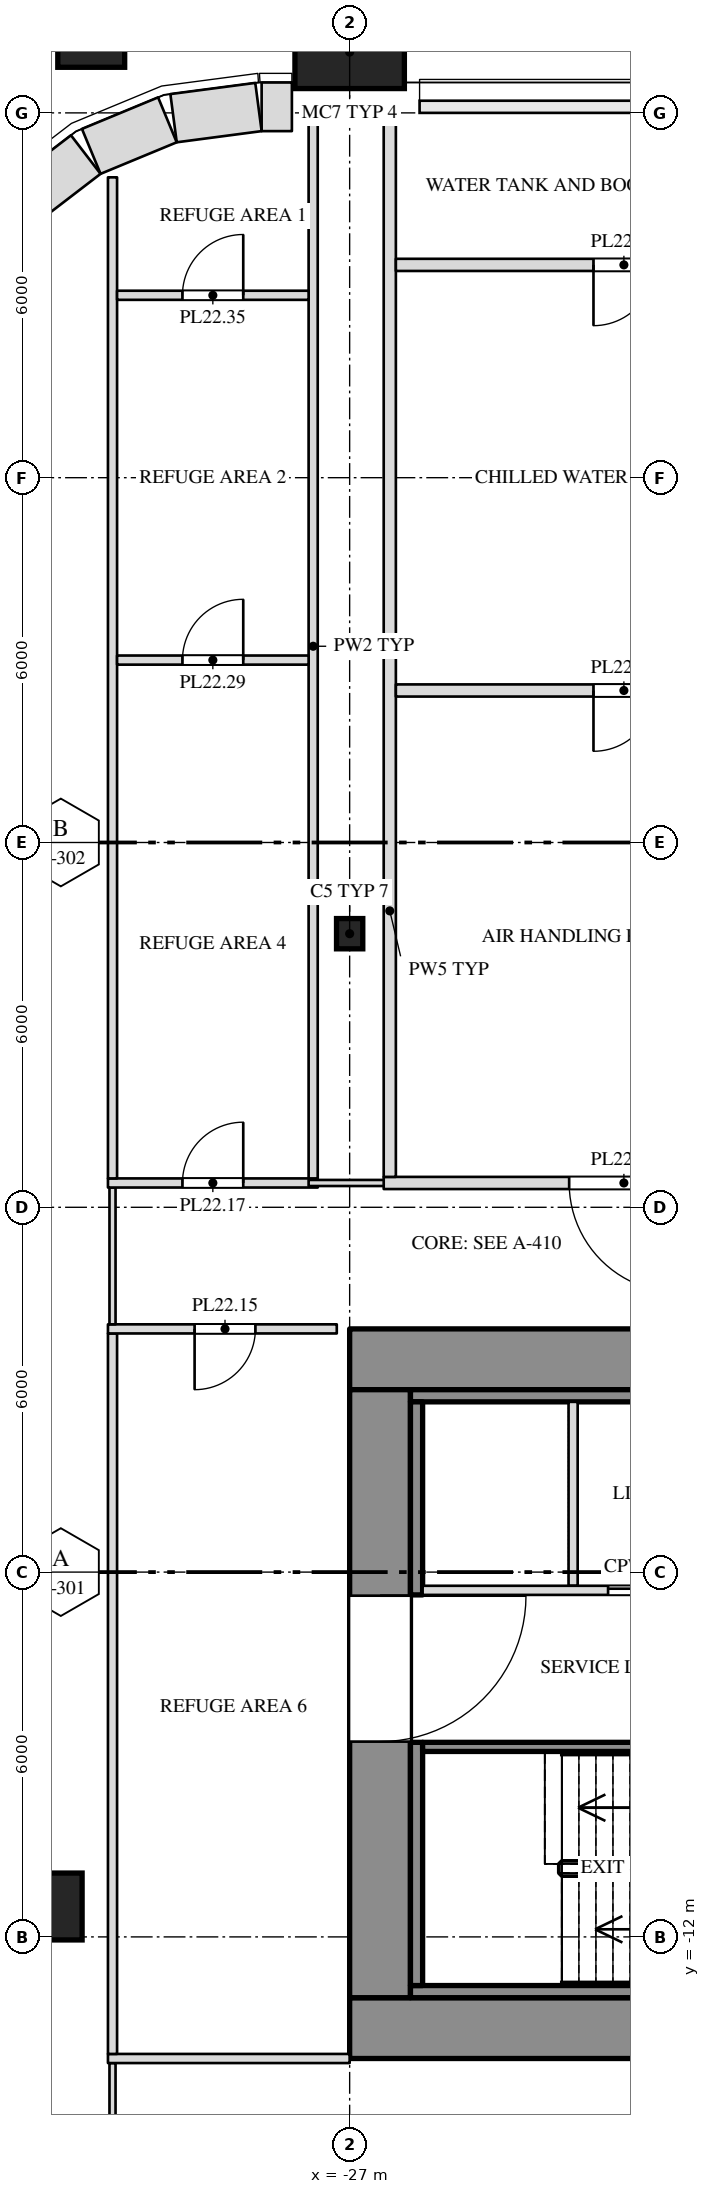
"""IFC4 building model, lengths in metres.
Left out: names, types, materials, properties, quantities, classifications, styles, units other than length and angle.
Written with IfcOpenShell. Run it as: python <this file> out.ifc"""

import sys

from ifc_helpers import new_model, si_unit, direction, frame, frame_2d, origin, origin_2d, place, context, subcontext, project, spatial, rectangle, i_section, extrude, clip, halfspace, element, fill, save


model = new_model("IFC4")
c1 = context("Model", 3, precision=1e-05, world=origin(), true_north=direction((0.0, 1.0)))
c2 = subcontext(c1, "Body", "Model", "MODEL_VIEW")
j1 = project(units=[si_unit("LENGTHUNIT", "METRE"), si_unit("PLANEANGLEUNIT", "RADIAN")], contexts=[c1])
p1 = place(None, origin())
s1 = spatial("IfcSite", under=j1, at=p1, CompositionType="ELEMENT")
p2 = place(p1, origin())
s2 = spatial("IfcBuilding", under=s1, at=p2, CompositionType="ELEMENT")
p3 = place(p2, frame((0.0, 0.0, 104.5)))
s3 = spatial("IfcBuildingStorey", under=s2, at=p3, CompositionType="ELEMENT", Elevation=104.5)
p4 = place(p3, frame((-31.95, -11.5, 0.0), z_axis=(0.0, 0.0, 1.0), x_axis=(1.0, 0.0, 0.0)))
e1 = element("IfcColumn", 1, at=p4, inside=s3, PredefinedType="COLUMN", context=c2, shape_type="SweptSolid", body=[
    extrude(rectangle(XDim=1.1, YDim=1.1, at=origin_2d()), origin(), (0.0, 0.0, 1.0), 4.0),
])
p5 = place(p3, frame((-27.0, 4.5, 0.0), z_axis=(0.0, 0.0, 1.0), x_axis=(1.0, 0.0, 0.0)))
e2 = element("IfcColumn", 2, at=p5, inside=s3, PredefinedType="COLUMN", context=c2, shape_type="SweptSolid", body=[
    extrude(i_section(OverallWidth=0.432, OverallDepth=0.498, WebThickness=0.056, FlangeThickness=0.089, at=origin_2d()), origin(), (0.0, 0.0, 1.0), 4.0),
])
p6 = place(p3, frame((-31.25, 19.0, 0.0), z_axis=(0.0, 0.242535625036, 0.970142500145), x_axis=(-1.0, 0.0, 0.0)))
e3 = element("IfcColumn", 3, at=p6, inside=s3, PredefinedType="COLUMN", context=c2, shape_type="Clipping", body=[
    clip(extrude(rectangle(XDim=1.1, YDim=1.1, at=origin_2d()), origin(), (0.0, 0.0, 1.0), 4.123), halfspace(frame((0.0, 0.0, 3.986)), False)),
])
p7 = place(p3, frame((-27.0, 19.0, 0.0), z_axis=(0.0, 0.242535625036, 0.970142500145), x_axis=(-1.0, 0.0, 0.0)))
e4 = element("IfcColumn", 4, at=p7, inside=s3, PredefinedType="COLUMN", context=c2, shape_type="Clipping", body=[
    clip(extrude(rectangle(XDim=1.8, YDim=1.8, at=origin_2d()), origin(), (0.0, 0.0, 1.0), 4.123), halfspace(frame((0.0, 0.0, 3.898)), False)),
])
p8 = place(p3, frame((-27.0, -2.5, 0.0), z_axis=(0.0, 0.0, 1.0), x_axis=(1.0, 0.0, 0.0)))
e5 = element("IfcWall", 5, at=p8, inside=s3, PredefinedType="SHEAR", context=c2, shape_type="SweptSolid", body=[
    extrude(rectangle(XDim=54.0, YDim=1.0, at=frame_2d((27.0, 0.0))), origin(), (0.0, 0.0, 1.0), 3.8),
])
p9 = place(p8, frame((15.15, 0.0, 0.0)))
e6 = element("IfcOpeningElement", 6, at=p9, cuts=e5, PredefinedType="OPENING", context=c2, shape_type="SweptSolid", body=[
    extrude(rectangle(XDim=2.4, YDim=2.1, at=frame_2d((1.2, 1.05))), frame((0.0, 0.512, 0.0), z_axis=(0.0, -1.0, 0.0), x_axis=(1.0, 0.0, 0.0)), (0.0, 0.0, 1.0), 1.024),
])
p10 = place(p8, frame((36.45, 0.0, 0.0)))
e7 = element("IfcOpeningElement", 7, at=p10, cuts=e5, PredefinedType="OPENING", context=c2, shape_type="SweptSolid", body=[
    extrude(rectangle(XDim=2.4, YDim=2.1, at=frame_2d((1.2, 1.05))), frame((0.0, 0.512, 0.0), z_axis=(0.0, -1.0, 0.0), x_axis=(1.0, 0.0, 0.0)), (0.0, 0.0, 1.0), 1.024),
])
p11 = place(p3, frame((-27.0, -13.5, 0.0), z_axis=(0.0, 0.0, 1.0), x_axis=(1.0, 0.0, 0.0)))
e8 = element("IfcWall", 8, at=p11, inside=s3, PredefinedType="SHEAR", context=c2, shape_type="SweptSolid", body=[
    extrude(rectangle(XDim=54.0, YDim=1.0, at=frame_2d((27.0, 0.0))), origin(), (0.0, 0.0, 1.0), 3.8),
])
p12 = place(p11, frame((16.45, 0.0, 0.0)))
e9 = element("IfcOpeningElement", 9, at=p12, cuts=e8, PredefinedType="OPENING", context=c2, shape_type="SweptSolid", body=[
    extrude(rectangle(XDim=1.0, YDim=2.1, at=frame_2d((0.5, 1.05))), frame((0.0, 0.512, 0.0), z_axis=(0.0, -1.0, 0.0), x_axis=(1.0, 0.0, 0.0)), (0.0, 0.0, 1.0), 1.024),
])
p13 = place(p11, frame((36.55, 0.0, 0.0)))
e10 = element("IfcOpeningElement", 10, at=p13, cuts=e8, PredefinedType="OPENING", context=c2, shape_type="SweptSolid", body=[
    extrude(rectangle(XDim=1.0, YDim=2.1, at=frame_2d((0.5, 1.05))), frame((0.0, 0.512, 0.0), z_axis=(0.0, -1.0, 0.0), x_axis=(1.0, 0.0, 0.0)), (0.0, 0.0, 1.0), 1.024),
])
p14 = place(p3, frame((-26.5, -13.0, 0.0), z_axis=(0.0, 0.0, 1.0), x_axis=(0.0, 1.0, 0.0)))
e11 = element("IfcWall", 11, at=p14, inside=s3, PredefinedType="SHEAR", context=c2, shape_type="SweptSolid", body=[
    extrude(rectangle(XDim=10.0, YDim=1.0, at=frame_2d((5.0, 0.0))), origin(), (0.0, 0.0, 1.0), 3.8),
])
p15 = place(p14, frame((4.212, 0.0, 0.0)))
e12 = element("IfcOpeningElement", 12, at=p15, cuts=e11, PredefinedType="OPENING", context=c2, shape_type="SweptSolid", body=[
    extrude(rectangle(XDim=2.4, YDim=2.1, at=frame_2d((1.2, 1.05))), frame((0.0, 0.512, 0.0), z_axis=(0.0, -1.0, 0.0), x_axis=(1.0, 0.0, 0.0)), (0.0, 0.0, 1.0), 1.024),
])
p16 = place(p3, frame((-26.0, -3.1, 0.0), z_axis=(0.0, 0.0, 1.0), x_axis=(1.0, 0.0, 0.0)))
e13 = element("IfcWall", 13, at=p16, inside=s3, PredefinedType="SHEAR", context=c2, shape_type="SweptSolid", body=[
    extrude(rectangle(XDim=14.0, YDim=0.2, at=frame_2d((7.0, 0.0))), origin(), (0.0, 0.0, 1.0), 3.8),
])
p17 = place(p3, frame((-26.0, -12.9, 0.0), z_axis=(0.0, 0.0, 1.0), x_axis=(1.0, 0.0, 0.0)))
e14 = element("IfcWall", 14, at=p17, inside=s3, PredefinedType="SHEAR", context=c2, shape_type="SweptSolid", body=[
    extrude(rectangle(XDim=15.2, YDim=0.2, at=frame_2d((7.6, 0.0))), origin(), (0.0, 0.0, 1.0), 3.8),
])
p18 = place(p3, frame((-25.9, -12.8, 0.0), z_axis=(0.0, 0.0, 1.0), x_axis=(0.0, 1.0, 0.0)))
e15 = element("IfcWall", 15, at=p18, inside=s3, PredefinedType="SHEAR", context=c2, shape_type="SweptSolid", body=[
    extrude(rectangle(XDim=4.0, YDim=0.2, at=frame_2d((2.0, 0.0))), origin(), (0.0, 0.0, 1.0), 3.8),
])
p19 = place(p3, frame((-25.9, -6.375, 0.0), z_axis=(0.0, 0.0, 1.0), x_axis=(0.0, 1.0, 0.0)))
e16 = element("IfcWall", 16, at=p19, inside=s3, PredefinedType="SHEAR", context=c2, shape_type="SweptSolid", body=[
    extrude(rectangle(XDim=3.175, YDim=0.2, at=frame_2d((1.587, 0.0))), origin(), (0.0, 0.0, 1.0), 3.8),
])
p20 = place(p3, frame((-30.9, -16.425, 0.0), z_axis=(0.0, 0.0, 1.0), x_axis=(0.0, 1.0, 0.0)))
e17 = element("IfcWall", 17, at=p20, inside=s3, PredefinedType="PARTITIONING", context=c2, shape_type="SweptSolid", body=[
    extrude(rectangle(XDim=2.35, YDim=0.1, at=frame_2d((1.175, 0.0))), origin(), (0.0, 0.0, 1.0), 3.8),
])
p21 = place(p3, frame((-30.975, -14.0, 0.0), z_axis=(0.0, 0.0, 1.0), x_axis=(1.0, 0.0, 0.0)))
e18 = element("IfcWall", 18, at=p21, inside=s3, PredefinedType="PARTITIONING", context=c2, shape_type="SweptSolid", body=[
    extrude(rectangle(XDim=3.975, YDim=0.15, at=frame_2d((1.988, 0.0))), origin(), (0.0, 0.0, 1.0), 3.8),
])
p22 = place(p3, frame((-30.9, -13.925, 0.0), z_axis=(0.0, 0.0, 1.0), x_axis=(0.0, 1.0, 0.0)))
e19 = element("IfcWall", 19, at=p22, inside=s3, PredefinedType="PARTITIONING", context=c2, shape_type="SweptSolid", body=[
    extrude(rectangle(XDim=11.85, YDim=0.15, at=frame_2d((5.925, 0.0))), origin(), (0.0, 0.0, 1.0), 3.8),
])
p23 = place(p3, frame((-30.975, -2.0, 0.0), z_axis=(0.0, 0.0, 1.0), x_axis=(1.0, 0.0, 0.0)))
e20 = element("IfcWall", 20, at=p23, inside=s3, PredefinedType="PARTITIONING", context=c2, shape_type="SweptSolid", body=[
    extrude(rectangle(XDim=3.763, YDim=0.15, at=frame_2d((1.882, 0.0))), origin(), (0.0, 0.0, 1.0), 3.8),
])
p24 = place(p23, frame((1.425, 0.0, 0.0)))
e21 = element("IfcOpeningElement", 21, at=p24, cuts=e20, PredefinedType="OPENING", context=c2, shape_type="SweptSolid", body=[
    extrude(rectangle(XDim=1.0, YDim=2.1, at=frame_2d((0.5, 1.05))), frame((0.0, 0.087, 0.0), z_axis=(0.0, -1.0, 0.0), x_axis=(1.0, 0.0, 0.0)), (0.0, 0.0, 1.0), 0.174),
])
p25 = place(p3, frame((-30.9, -1.925, 0.0), z_axis=(0.0, 0.0, 1.0), x_axis=(0.0, 1.0, 0.0)))
e22 = element("IfcWall", 22, at=p25, inside=s3, PredefinedType="PARTITIONING", context=c2, shape_type="SweptSolid", body=[
    extrude(rectangle(XDim=2.25, YDim=0.1, at=frame_2d((1.125, 0.0))), origin(), (0.0, 0.0, 1.0), 3.8),
])
p26 = place(p3, frame((-30.975, 0.4, 0.0), z_axis=(0.0, 0.0, 1.0), x_axis=(1.0, 0.0, 0.0)))
e23 = element("IfcWall", 23, at=p26, inside=s3, PredefinedType="PARTITIONING", context=c2, shape_type="SweptSolid", body=[
    extrude(rectangle(XDim=3.45, YDim=0.15, at=frame_2d((1.725, 0.0))), origin(), (0.0, 0.0, 1.0), 3.8),
])
p27 = place(p26, frame((1.225, 0.0, 0.0)))
e24 = element("IfcOpeningElement", 24, at=p27, cuts=e23, PredefinedType="OPENING", context=c2, shape_type="SweptSolid", body=[
    extrude(rectangle(XDim=1.0, YDim=2.1, at=frame_2d((0.5, 1.05))), frame((0.0, 0.087, 0.0), z_axis=(0.0, -1.0, 0.0), x_axis=(1.0, 0.0, 0.0)), (0.0, 0.0, 1.0), 0.174),
])
p28 = place(p3, frame((-30.9, 0.475, 0.0), z_axis=(0.0, 0.0, 1.0), x_axis=(0.0, 1.0, 0.0)))
e25 = element("IfcWall", 25, at=p28, inside=s3, PredefinedType="PARTITIONING", context=c2, shape_type="SweptSolid", body=[
    extrude(rectangle(XDim=16.465, YDim=0.15, at=frame_2d((8.232, 0.0))), origin(), (0.0, 0.0, 1.0), 3.8),
])
p29 = place(p3, frame((-27.675, 0.4, 0.0), z_axis=(0.0, 0.0, 1.0), x_axis=(1.0, 0.0, 0.0)))
e26 = element("IfcWall", 26, at=p29, inside=s3, PredefinedType="PARTITIONING", context=c2, shape_type="SweptSolid", body=[
    extrude(rectangle(XDim=1.435, YDim=0.1, at=frame_2d((0.718, 0.0))), origin(), (0.0, 0.0, 1.0), 3.8),
])
p30 = place(p3, frame((-27.6, 0.475, 0.0), z_axis=(0.0, 0.0, 1.0), x_axis=(0.0, 1.0, 0.0)))
e27 = element("IfcWall", 27, at=p30, inside=s3, PredefinedType="PARTITIONING", context=c2, shape_type="SweptSolid", body=[
    extrude(rectangle(XDim=17.505, YDim=0.15, at=frame_2d((8.752, 0.0))), origin(), (0.0, 0.0, 1.0), 3.8),
])
p31 = place(p3, frame((-26.44, 0.4, 0.0), z_axis=(0.0, 0.0, 1.0), x_axis=(1.0, 0.0, 0.0)))
e28 = element("IfcWall", 28, at=p31, inside=s3, PredefinedType="PARTITIONING", context=c2, shape_type="SweptSolid", body=[
    extrude(rectangle(XDim=7.88, YDim=0.2, at=frame_2d((3.94, 0.0))), origin(), (0.0, 0.0, 1.0), 3.8),
])
p32 = place(p31, frame((3.05, 0.0, 0.0)))
e29 = element("IfcOpeningElement", 29, at=p32, cuts=e28, PredefinedType="OPENING", context=c2, shape_type="SweptSolid", body=[
    extrude(rectangle(XDim=1.8, YDim=2.1, at=frame_2d((0.9, 1.05))), frame((0.0, 0.112, 0.0), z_axis=(0.0, -1.0, 0.0), x_axis=(1.0, 0.0, 0.0)), (0.0, 0.0, 1.0), 0.224),
])
p33 = place(p3, frame((-26.34, 0.5, 0.0), z_axis=(0.0, 0.0, 1.0), x_axis=(0.0, 1.0, 0.0)))
e30 = element("IfcWall", 30, at=p33, inside=s3, PredefinedType="PARTITIONING", context=c2, shape_type="SweptSolid", body=[
    extrude(rectangle(XDim=17.5, YDim=0.2, at=frame_2d((8.75, 0.0))), origin(), (0.0, 0.0, 1.0), 3.8),
])
p34 = place(p3, frame((-26.24, 8.5, 0.0), z_axis=(0.0, 0.0, 1.0), x_axis=(1.0, 0.0, 0.0)))
e31 = element("IfcWall", 31, at=p34, inside=s3, PredefinedType="PARTITIONING", context=c2, shape_type="SweptSolid", body=[
    extrude(rectangle(XDim=7.48, YDim=0.2, at=frame_2d((3.74, 0.0))), origin(), (0.0, 0.0, 1.0), 3.8),
])
p35 = place(p34, frame((3.25, 0.0, 0.0)))
e32 = element("IfcOpeningElement", 32, at=p35, cuts=e31, PredefinedType="OPENING", context=c2, shape_type="SweptSolid", body=[
    extrude(rectangle(XDim=1.0, YDim=2.1, at=frame_2d((0.5, 1.05))), frame((0.0, 0.112, 0.0), z_axis=(0.0, -1.0, 0.0), x_axis=(1.0, 0.0, 0.0)), (0.0, 0.0, 1.0), 0.224),
])
p36 = place(p3, frame((-30.825, 9.0, 0.0), z_axis=(0.0, 0.0, 1.0), x_axis=(1.0, 0.0, 0.0)))
e33 = element("IfcWall", 33, at=p36, inside=s3, PredefinedType="PARTITIONING", context=c2, shape_type="SweptSolid", body=[
    extrude(rectangle(XDim=3.15, YDim=0.15, at=frame_2d((1.575, 0.0))), origin(), (0.0, 0.0, 1.0), 3.198),
])
p37 = place(p36, frame((1.075, 0.0, 0.0)))
e34 = element("IfcOpeningElement", 34, at=p37, cuts=e33, PredefinedType="OPENING", context=c2, shape_type="SweptSolid", body=[
    extrude(rectangle(XDim=1.0, YDim=2.1, at=frame_2d((0.5, 1.05))), frame((0.0, 0.087, 0.0), z_axis=(0.0, -1.0, 0.0), x_axis=(1.0, 0.0, 0.0)), (0.0, 0.0, 1.0), 0.174),
])
p38 = place(p3, frame((-30.825, 15.0, 0.0), z_axis=(0.0, 0.0, 1.0), x_axis=(1.0, 0.0, 0.0)))
e35 = element("IfcWall", 35, at=p38, inside=s3, PredefinedType="PARTITIONING", context=c2, shape_type="SweptSolid", body=[
    extrude(rectangle(XDim=3.15, YDim=0.15, at=frame_2d((1.575, 0.0))), origin(), (0.0, 0.0, 1.0), 3.8),
])
p39 = place(p38, frame((1.075, 0.0, 0.0)))
e36 = element("IfcOpeningElement", 36, at=p39, cuts=e35, PredefinedType="OPENING", context=c2, shape_type="SweptSolid", body=[
    extrude(rectangle(XDim=1.0, YDim=2.1, at=frame_2d((0.5, 1.05))), frame((0.0, 0.087, 0.0), z_axis=(0.0, -1.0, 0.0), x_axis=(1.0, 0.0, 0.0)), (0.0, 0.0, 1.0), 0.174),
])
p40 = place(p3, frame((-26.24, 15.5, 0.0), z_axis=(0.0, 0.0, 1.0), x_axis=(1.0, 0.0, 0.0)))
e37 = element("IfcWall", 37, at=p40, inside=s3, PredefinedType="PARTITIONING", context=c2, shape_type="SweptSolid", body=[
    extrude(rectangle(XDim=7.48, YDim=0.2, at=frame_2d((3.74, 0.0))), origin(), (0.0, 0.0, 1.0), 3.8),
])
p41 = place(p40, frame((3.25, 0.0, 0.0)))
e38 = element("IfcOpeningElement", 38, at=p41, cuts=e37, PredefinedType="OPENING", context=c2, shape_type="SweptSolid", body=[
    extrude(rectangle(XDim=1.0, YDim=2.1, at=frame_2d((0.5, 1.05))), frame((0.0, 0.112, 0.0), z_axis=(0.0, -1.0, 0.0), x_axis=(1.0, 0.0, 0.0)), (0.0, 0.0, 1.0), 0.224),
])
p42 = place(p3, frame((-27.95, 18.1, 0.0), z_axis=(0.0, 0.0, 1.0), x_axis=(-1.0, 0.0, 0.0)))
e39 = element("IfcWall", 39, at=p42, inside=s3, PredefinedType="SOLIDWALL", context=c2, shape_type="SweptSolid", body=[
    extrude(rectangle(XDim=0.498, YDim=0.8, at=frame_2d((0.249, 0.0))), origin(), (0.0, 0.0, 1.0), 3.8),
])
p43 = place(p3, frame((-28.5, 18.097, 0.0), z_axis=(0.0, 0.0, 1.0), x_axis=(-0.99144603414, -0.130517283865, 0.0)))
e40 = element("IfcWall", 40, at=p43, inside=s3, PredefinedType="SOLIDWALL", context=c2, shape_type="SweptSolid", body=[
    extrude(rectangle(XDim=1.408, YDim=0.8, at=frame_2d((0.704, 0.0))), origin(), (0.0, 0.0, 1.0), 3.8),
])
p44 = place(p3, frame((-29.997, 17.886, 0.0), z_axis=(0.0, 0.0, 1.0), x_axis=(-0.923847774587, -0.38276009378, 0.0)))
e41 = element("IfcWall", 41, at=p44, inside=s3, PredefinedType="SOLIDWALL", context=c2, shape_type="SweptSolid", body=[
    extrude(rectangle(XDim=1.355, YDim=0.8, at=frame_2d((0.678, 0.0))), origin(), (0.0, 0.0, 1.0), 3.8),
])
p45 = place(p3, frame((-31.34, 17.315, 0.0), z_axis=(0.0, 0.0, 1.0), x_axis=(-0.793272915452, -0.608866226366, 0.0)))
e42 = element("IfcWall", 42, at=p45, inside=s3, PredefinedType="SOLIDWALL", context=c2, shape_type="SweptSolid", body=[
    extrude(rectangle(XDim=1.356, YDim=0.8, at=frame_2d((0.678, 0.0))), origin(), (0.0, 0.0, 1.0), 3.8),
])
p46 = place(p3, frame((-23.325, -6.225, 0.0), z_axis=(0.0, 0.0, 1.0), x_axis=(0.0, 1.0, 0.0)))
e43 = element("IfcWall", 43, at=p46, inside=s3, PredefinedType="PARTITIONING", context=c2, shape_type="SweptSolid", body=[
    extrude(rectangle(XDim=3.025, YDim=0.15, at=frame_2d((1.513, 0.0))), origin(), (0.0, 0.0, 1.0), 3.8),
])
p47 = place(p3, frame((-25.8, -6.3, 0.0), z_axis=(0.0, 0.0, 1.0), x_axis=(1.0, 0.0, 0.0)))
e44 = element("IfcWall", 44, at=p47, inside=s3, PredefinedType="PARTITIONING", context=c2, shape_type="SweptSolid", body=[
    extrude(rectangle(XDim=7.5, YDim=0.15, at=frame_2d((3.75, 0.0))), origin(), (0.0, 0.0, 1.0), 3.8),
])
p48 = place(p47, frame((3.05, 0.0, 0.0)))
e45 = element("IfcOpeningElement", 45, at=p48, cuts=e44, PredefinedType="OPENING", context=c2, shape_type="SweptSolid", body=[
    extrude(rectangle(XDim=1.4, YDim=2.1, at=frame_2d((0.7, 1.05))), frame((0.0, 0.087, 0.0), z_axis=(0.0, -1.0, 0.0), x_axis=(1.0, 0.0, 0.0)), (0.0, 0.0, 1.0), 0.174),
])
p49 = place(p47, frame((5.75, 0.0, 0.0)))
e46 = element("IfcOpeningElement", 46, at=p49, cuts=e44, PredefinedType="OPENING", context=c2, shape_type="SweptSolid", body=[
    extrude(rectangle(XDim=1.1, YDim=2.1, at=frame_2d((0.55, 1.05))), frame((0.0, 0.087, 0.0), z_axis=(0.0, -1.0, 0.0), x_axis=(1.0, 0.0, 0.0)), (0.0, 0.0, 1.0), 0.174),
])
p50 = place(p3, frame((-25.8, -8.875, 0.0), z_axis=(0.0, 0.0, 1.0), x_axis=(1.0, 0.0, 0.0)))
e47 = element("IfcWall", 47, at=p50, inside=s3, PredefinedType="SHEAR", context=c2, shape_type="SweptSolid", body=[
    extrude(rectangle(XDim=7.5, YDim=0.15, at=frame_2d((3.75, 0.0))), origin(), (0.0, 0.0, 1.0), 3.8),
])
p51 = place(p50, frame((5.875, 0.0, 0.0)))
e48 = element("IfcOpeningElement", 48, at=p51, cuts=e47, PredefinedType="OPENING", context=c2, shape_type="SweptSolid", body=[
    extrude(rectangle(XDim=1.4, YDim=2.1, at=frame_2d((0.7, 1.05))), frame((0.0, 0.087, 0.0), z_axis=(0.0, -1.0, 0.0), x_axis=(1.0, 0.0, 0.0)), (0.0, 0.0, 1.0), 0.174),
])
p52 = place(p24, origin())
e49 = element("IfcDoor", 49, at=p52, inside=s3, OperationType="SINGLE_SWING_RIGHT", PredefinedType="DOOR", context=c2, shape_type="SweptSolid", body=[
    extrude(rectangle(XDim=1.0, YDim=2.1, at=frame_2d((0.5, 1.05))), frame((0.0, 0.025, 0.0), z_axis=(0.0, -1.0, 0.0), x_axis=(1.0, 0.0, 0.0)), (0.0, 0.0, 1.0), 0.05),
])
fill(e21, e49)
p53 = place(p27, origin())
e50 = element("IfcDoor", 50, at=p53, inside=s3, OperationType="SINGLE_SWING_RIGHT", PredefinedType="DOOR", context=c2, shape_type="SweptSolid", body=[
    extrude(rectangle(XDim=1.0, YDim=2.1, at=frame_2d((0.5, 1.05))), frame((0.0, 0.025, 0.0), z_axis=(0.0, -1.0, 0.0), x_axis=(1.0, 0.0, 0.0)), (0.0, 0.0, 1.0), 0.05),
])
fill(e24, e50)
p54 = place(p32, origin())
e51 = element("IfcDoor", 51, at=p54, inside=s3, OperationType="DOUBLE_DOOR_SINGLE_SWING", PredefinedType="DOOR", context=c2, shape_type="SweptSolid", body=[
    extrude(rectangle(XDim=1.8, YDim=2.1, at=frame_2d((0.9, 1.05))), frame((0.0, 0.025, 0.0), z_axis=(0.0, -1.0, 0.0), x_axis=(1.0, 0.0, 0.0)), (0.0, 0.0, 1.0), 0.05),
])
fill(e29, e51)
p55 = place(p35, origin())
e52 = element("IfcDoor", 52, at=p55, inside=s3, OperationType="SINGLE_SWING_RIGHT", PredefinedType="DOOR", context=c2, shape_type="SweptSolid", body=[
    extrude(rectangle(XDim=1.0, YDim=2.1, at=frame_2d((0.5, 1.05))), frame((0.0, 0.025, 0.0), z_axis=(0.0, -1.0, 0.0), x_axis=(1.0, 0.0, 0.0)), (0.0, 0.0, 1.0), 0.05),
])
fill(e32, e52)
p56 = place(p37, origin())
e53 = element("IfcDoor", 53, at=p56, inside=s3, OperationType="SINGLE_SWING_RIGHT", PredefinedType="DOOR", context=c2, shape_type="SweptSolid", body=[
    extrude(rectangle(XDim=1.0, YDim=2.1, at=frame_2d((0.5, 1.05))), frame((0.0, 0.025, 0.0), z_axis=(0.0, -1.0, 0.0), x_axis=(1.0, 0.0, 0.0)), (0.0, 0.0, 1.0), 0.05),
])
fill(e34, e53)
p57 = place(p39, origin())
e54 = element("IfcDoor", 54, at=p57, inside=s3, OperationType="SINGLE_SWING_RIGHT", PredefinedType="DOOR", context=c2, shape_type="SweptSolid", body=[
    extrude(rectangle(XDim=1.0, YDim=2.1, at=frame_2d((0.5, 1.05))), frame((0.0, 0.025, 0.0), z_axis=(0.0, -1.0, 0.0), x_axis=(1.0, 0.0, 0.0)), (0.0, 0.0, 1.0), 0.05),
])
fill(e36, e54)
p58 = place(p41, origin())
e55 = element("IfcDoor", 55, at=p58, inside=s3, OperationType="SINGLE_SWING_RIGHT", PredefinedType="DOOR", context=c2, shape_type="SweptSolid", body=[
    extrude(rectangle(XDim=1.0, YDim=2.1, at=frame_2d((0.5, 1.05))), frame((0.0, 0.025, 0.0), z_axis=(0.0, -1.0, 0.0), x_axis=(1.0, 0.0, 0.0)), (0.0, 0.0, 1.0), 0.05),
])
fill(e38, e55)
p59 = place(p15, origin())
e56 = element("IfcDoor", 56, at=p59, inside=s3, OperationType="DOUBLE_DOOR_SINGLE_SWING", PredefinedType="DOOR", context=c2, shape_type="SweptSolid", body=[
    extrude(rectangle(XDim=2.4, YDim=2.1, at=frame_2d((1.2, 1.05))), frame((0.0, 0.025, 0.0), z_axis=(0.0, -1.0, 0.0), x_axis=(1.0, 0.0, 0.0)), (0.0, 0.0, 1.0), 0.05),
])
fill(e12, e56)
p60 = place(p48, origin())
e57 = element("IfcDoor", 57, at=p60, inside=s3, OperationType="SLIDING_TO_RIGHT", PredefinedType="DOOR", context=c2, shape_type="SweptSolid", body=[
    extrude(rectangle(XDim=1.4, YDim=2.1, at=frame_2d((0.7, 1.05))), frame((0.0, 0.025, 0.0), z_axis=(0.0, -1.0, 0.0), x_axis=(1.0, 0.0, 0.0)), (0.0, 0.0, 1.0), 0.05),
])
fill(e45, e57)
save(model, sys.argv[1])
